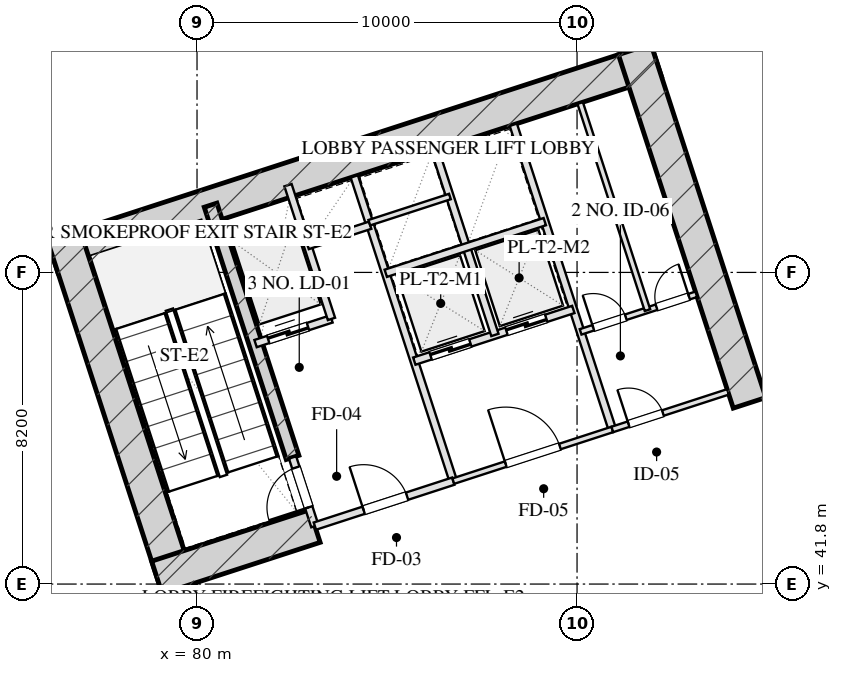
"""IFC4 building model, lengths in metres.
Left out: names, types, materials, properties, quantities, classifications, styles, units other than length and angle.
Written with IfcOpenShell. Run it as: python <this file> out.ifc"""

import sys

from ifc_helpers import new_model, si_unit, direction, frame, frame_2d, origin, place, context, subcontext, project, spatial, rectangle, extrude, element, fill, save


model = new_model("IFC4")
c1 = context("Model", 3, precision=1e-05, world=origin(), true_north=direction((0.0, 1.0)))
c2 = subcontext(c1, "Body", "Model", "MODEL_VIEW")
j1 = project(units=[si_unit("LENGTHUNIT", "METRE"), si_unit("PLANEANGLEUNIT", "RADIAN")], contexts=[c1])
p1 = place(None, origin())
s1 = spatial("IfcSite", under=j1, at=p1, CompositionType="ELEMENT")
p2 = place(p1, origin())
s2 = spatial("IfcBuilding", under=s1, at=p2, CompositionType="ELEMENT")
p3 = place(p2, frame((0.0, 0.0, 6.0)))
s3 = spatial("IfcBuildingStorey", under=s2, at=p3, CompositionType="ELEMENT", Elevation=6.0)
p4 = place(p3, frame((76.201, 50.419, 0.0), z_axis=(0.0, 0.0, 1.0), x_axis=(0.951056412142, 0.309017314926, 0.0)))
e1 = element("IfcWall", 1, at=p4, inside=s3, PredefinedType="SHEAR", context=c2, shape_type="SweptSolid", body=[
    extrude(rectangle(XDim=16.7, YDim=0.9, at=frame_2d((8.35, 0.0))), origin(), (0.0, 0.0, 1.0), 5.5),
])
for number, where, z_axis, x_axis in (
    (2, (79.512, 41.685, 0.0), (0.0, 0.0, 1.0), (-0.309, 0.951, 0.0)),
    (3, (94.539, 46.568, 0.0), (0.0, 0.0, 1.0), (-0.309, 0.951, 0.0)),
):
    element("IfcWall", number, at=place(p3, frame(where, z_axis=z_axis, x_axis=x_axis)), inside=s3, PredefinedType="SHEAR", context=c2, shape_type="SweptSolid", body=[
        extrude(rectangle(XDim=9.78, YDim=0.9, at=frame_2d((4.89, 0.0))), origin(), (0.0, 0.0, 1.0), 5.5),
    ])
p5 = place(p3, frame((82.514, 45.131, 0.0), z_axis=(0.0, 0.0, 1.0), x_axis=(-0.308988790936, 0.951065679686, 0.0)))
e4 = element("IfcWall", 4, at=p5, inside=s3, PredefinedType="SHEAR", context=c2, shape_type="SweptSolid", body=[
    extrude(rectangle(XDim=6.98, YDim=0.35, at=frame_2d((3.49, 0.0))), origin(), (0.0, 0.0, 1.0), 5.5),
])
p6 = place(p3, frame((78.945, 41.974, 0.0), z_axis=(0.0, 0.0, 1.0), x_axis=(0.951058289404, 0.309011537255, 0.0)))
e5 = element("IfcWall", 5, at=p6, inside=s3, PredefinedType="SHEAR", context=c2, shape_type="SweptSolid", body=[
    extrude(rectangle(XDim=4.37, YDim=0.9, at=frame_2d((2.185, 0.0))), origin(), (0.0, 0.0, 1.0), 5.5),
])
p7 = place(p3, frame((83.101, 43.324, 0.0), z_axis=(0.0, 0.0, 1.0), x_axis=(-0.309048298632, 0.951046344356, 0.0)))
e6 = element("IfcWall", 6, at=p7, inside=s3, PredefinedType="PARTITIONING", context=c2, shape_type="SweptSolid", body=[
    extrude(rectangle(XDim=1.9, YDim=0.2, at=frame_2d((0.95, 0.0))), origin(), (0.0, 0.0, 1.0), 5.185),
])
p8 = place(p7, frame((0.52, 0.0, 0.0)))
e7 = element("IfcOpeningElement", 7, at=p8, cuts=e6, PredefinedType="OPENING", context=c2, shape_type="SweptSolid", body=[
    extrude(rectangle(XDim=1.1, YDim=2.05, at=frame_2d((0.55, 1.025))), frame((0.0, 0.11, 0.0), z_axis=(0.0, -1.0, 0.0), x_axis=(1.0, 0.0, 0.0)), (0.0, 0.0, 1.0), 0.22),
])
p9 = place(p3, frame((86.743, 44.508, 0.0), z_axis=(0.0, 0.0, 1.0), x_axis=(-0.309016001439, 0.951056838919, 0.0)))
e8 = element("IfcWall", 8, at=p9, inside=s3, PredefinedType="PARTITIONING", context=c2, shape_type="SweptSolid", body=[
    extrude(rectangle(XDim=8.43, YDim=0.2, at=frame_2d((4.215, 0.0))), origin(), (0.0, 0.0, 1.0), 5.185),
])
p10 = place(p3, frame((83.101, 43.324, 0.0), z_axis=(0.0, 0.0, 1.0), x_axis=(0.951052804469, 0.309028417967, 0.0)))
e9 = element("IfcWall", 9, at=p10, inside=s3, PredefinedType="PARTITIONING", context=c2, shape_type="SweptSolid", body=[
    extrude(rectangle(XDim=3.83, YDim=0.2, at=frame_2d((1.915, 0.0))), origin(), (0.0, 0.0, 1.0), 5.185),
])
p11 = place(p10, frame((1.35, 0.0, 0.0)))
e10 = element("IfcOpeningElement", 10, at=p11, cuts=e9, PredefinedType="OPENING", context=c2, shape_type="SweptSolid", body=[
    extrude(rectangle(XDim=1.2, YDim=2.05, at=frame_2d((0.6, 1.025))), frame((0.0, 0.11, 0.0), z_axis=(0.0, -1.0, 0.0), x_axis=(1.0, 0.0, 0.0)), (0.0, 0.0, 1.0), 0.22),
])
p12 = place(p3, frame((81.54, 48.127, 0.0), z_axis=(0.0, 0.0, 1.0), x_axis=(0.951062257173, 0.308999325213, 0.0)))
e11 = element("IfcWall", 11, at=p12, inside=s3, PredefinedType="PARTITIONING", context=c2, shape_type="SweptSolid", body=[
    extrude(rectangle(XDim=2.1, YDim=0.2, at=frame_2d((1.05, 0.0))), origin(), (0.0, 0.0, 1.0), 5.185),
])
p13 = place(p12, frame((0.35, 0.0, 0.0)))
e12 = element("IfcOpeningElement", 12, at=p13, cuts=e11, PredefinedType="OPENING", context=c2, shape_type="SweptSolid", body=[
    extrude(rectangle(XDim=1.1, YDim=2.05, at=frame_2d((0.55, 1.025))), frame((0.0, 0.11, 0.0), z_axis=(0.0, -1.0, 0.0), x_axis=(1.0, 0.0, 0.0)), (0.0, 0.0, 1.0), 0.22),
])
p14 = place(p3, frame((83.538, 48.776, 0.0), z_axis=(0.0, 0.0, 1.0), x_axis=(-0.3089935693, 0.951064127245, 0.0)))
e13 = element("IfcWall", 13, at=p14, inside=s3, PredefinedType="PARTITIONING", context=c2, shape_type="SweptSolid", body=[
    extrude(rectangle(XDim=3.7, YDim=0.2, at=frame_2d((1.85, 0.0))), origin(), (0.0, 0.0, 1.0), 5.185),
])
p15 = place(p3, frame((82.91, 50.707, 0.0), z_axis=(0.0, 0.0, 1.0), x_axis=(0.951041328149, 0.309063734775, 0.0)))
e14 = element("IfcWall", 14, at=p15, inside=s3, PredefinedType="PARTITIONING", context=c2, shape_type="SweptSolid", body=[
    extrude(rectangle(XDim=1.73, YDim=0.2, at=frame_2d((0.865, 0.0))), origin(), (0.0, 0.0, 1.0), 5.185),
])
p16 = place(p3, frame((90.928, 45.868, 0.0), z_axis=(0.0, 0.0, 1.0), x_axis=(-0.309042196757, 0.951048327176, 0.0)))
e15 = element("IfcWall", 15, at=p16, inside=s3, PredefinedType="PARTITIONING", context=c2, shape_type="SweptSolid", body=[
    extrude(rectangle(XDim=8.43, YDim=0.2, at=frame_2d((4.215, 0.0))), origin(), (0.0, 0.0, 1.0), 5.185),
])
p17 = place(p3, frame((86.743, 44.508, 0.0), z_axis=(0.0, 0.0, 1.0), x_axis=(0.951063829732, 0.308994485023, 0.0)))
e16 = element("IfcWall", 16, at=p17, inside=s3, PredefinedType="PARTITIONING", context=c2, shape_type="SweptSolid", body=[
    extrude(rectangle(XDim=4.4, YDim=0.15, at=frame_2d((2.2, 0.0))), origin(), (0.0, 0.0, 1.0), 5.185),
])
p18 = place(p17, frame((1.45, 0.0, 0.0)))
e17 = element("IfcOpeningElement", 17, at=p18, cuts=e16, PredefinedType="OPENING", context=c2, shape_type="SweptSolid", body=[
    extrude(rectangle(XDim=1.5, YDim=2.05, at=frame_2d((0.75, 1.025))), frame((0.0, 0.085, 0.0), z_axis=(0.0, -1.0, 0.0), x_axis=(1.0, 0.0, 0.0)), (0.0, 0.0, 1.0), 0.17),
])
p19 = place(p3, frame((85.718, 47.666, 0.0), z_axis=(0.0, 0.0, 1.0), x_axis=(0.951058531764, 0.30901079133, 0.0)))
e18 = element("IfcWall", 18, at=p19, inside=s3, PredefinedType="PARTITIONING", context=c2, shape_type="SweptSolid", body=[
    extrude(rectangle(XDim=4.4, YDim=0.2, at=frame_2d((2.2, 0.0))), origin(), (0.0, 0.0, 1.0), 5.185),
])
p20 = place(p19, frame((0.45, 0.0, 0.0)))
e19 = element("IfcOpeningElement", 19, at=p20, cuts=e18, PredefinedType="OPENING", context=c2, shape_type="SweptSolid", body=[
    extrude(rectangle(XDim=1.1, YDim=2.05, at=frame_2d((0.55, 1.025))), frame((0.0, 0.11, 0.0), z_axis=(0.0, -1.0, 0.0), x_axis=(1.0, 0.0, 0.0)), (0.0, 0.0, 1.0), 0.22),
])
p21 = place(p19, frame((2.55, 0.0, 0.0)))
e20 = element("IfcOpeningElement", 20, at=p21, cuts=e18, PredefinedType="OPENING", context=c2, shape_type="SweptSolid", body=[
    extrude(rectangle(XDim=1.1, YDim=2.05, at=frame_2d((0.55, 1.025))), frame((0.0, 0.11, 0.0), z_axis=(0.0, -1.0, 0.0), x_axis=(1.0, 0.0, 0.0)), (0.0, 0.0, 1.0), 0.22),
])
p22 = place(p3, frame((87.838, 48.354, 0.0), z_axis=(0.0, 0.0, 1.0), x_axis=(-0.3090093719, 0.951058992953, 0.0)))
e21 = element("IfcWall", 21, at=p22, inside=s3, PredefinedType="PARTITIONING", context=c2, shape_type="SweptSolid", body=[
    extrude(rectangle(XDim=5.11, YDim=0.2, at=frame_2d((2.555, 0.0))), origin(), (0.0, 0.0, 1.0), 5.185),
])
p23 = place(p3, frame((84.967, 49.977, 0.0), z_axis=(0.0, 0.0, 1.0), x_axis=(0.951063829732, 0.308994485023, 0.0)))
e22 = element("IfcWall", 22, at=p23, inside=s3, PredefinedType="PARTITIONING", context=c2, shape_type="SweptSolid", body=[
    extrude(rectangle(XDim=4.4, YDim=0.2, at=frame_2d((2.2, 0.0))), origin(), (0.0, 0.0, 1.0), 5.185),
])
p24 = place(p3, frame((84.534, 51.308, 0.0), z_axis=(0.0, 0.0, 1.0), x_axis=(0.951075093106, 0.308959814982, 0.0)))
e23 = element("IfcWall", 23, at=p24, inside=s3, PredefinedType="PARTITIONING", context=c2, shape_type="SweptSolid", body=[
    extrude(rectangle(XDim=2.23, YDim=0.15, at=frame_2d((1.115, 0.0))), origin(), (0.0, 0.0, 1.0), 5.185),
])
p25 = place(p3, frame((90.928, 45.868, 0.0), z_axis=(0.0, 0.0, 1.0), x_axis=(0.951059297078, 0.309008435874, 0.0)))
e24 = element("IfcWall", 24, at=p25, inside=s3, PredefinedType="PARTITIONING", context=c2, shape_type="SweptSolid", body=[
    extrude(rectangle(XDim=3.2, YDim=0.15, at=frame_2d((1.6, 0.0))), origin(), (0.0, 0.0, 1.0), 5.185),
])
p26 = place(p25, frame((0.45, 0.0, 0.0)))
e25 = element("IfcOpeningElement", 25, at=p26, cuts=e24, PredefinedType="OPENING", context=c2, shape_type="SweptSolid", body=[
    extrude(rectangle(XDim=0.95, YDim=2.05, at=frame_2d((0.475, 1.025))), frame((0.0, 0.085, 0.0), z_axis=(0.0, -1.0, 0.0), x_axis=(1.0, 0.0, 0.0)), (0.0, 0.0, 1.0), 0.17),
])
p27 = place(p3, frame((90.094, 48.436, 0.0), z_axis=(0.0, 0.0, 1.0), x_axis=(0.951066581729, 0.308986014439, 0.0)))
e26 = element("IfcWall", 26, at=p27, inside=s3, PredefinedType="PARTITIONING", context=c2, shape_type="SweptSolid", body=[
    extrude(rectangle(XDim=3.2, YDim=0.15, at=frame_2d((1.6, 0.0))), origin(), (0.0, 0.0, 1.0), 5.185),
])
p28 = place(p27, frame((0.35, 0.0, 0.0)))
e27 = element("IfcOpeningElement", 27, at=p28, cuts=e26, PredefinedType="OPENING", context=c2, shape_type="SweptSolid", body=[
    extrude(rectangle(XDim=0.9, YDim=2.05, at=frame_2d((0.45, 1.025))), frame((0.0, 0.085, 0.0), z_axis=(0.0, -1.0, 0.0), x_axis=(1.0, 0.0, 0.0)), (0.0, 0.0, 1.0), 0.17),
])
p29 = place(p27, frame((2.1, 0.0, 0.0)))
e28 = element("IfcOpeningElement", 28, at=p29, cuts=e26, PredefinedType="OPENING", context=c2, shape_type="SweptSolid", body=[
    extrude(rectangle(XDim=0.9, YDim=2.05, at=frame_2d((0.45, 1.025))), frame((0.0, 0.085, 0.0), z_axis=(0.0, -1.0, 0.0), x_axis=(1.0, 0.0, 0.0)), (0.0, 0.0, 1.0), 0.17),
])
p30 = place(p3, frame((91.853, 49.007, 0.0), z_axis=(0.0, 0.0, 1.0), x_axis=(-0.309022487551, 0.951054731437, 0.0)))
e29 = element("IfcWall", 29, at=p30, inside=s3, PredefinedType="PARTITIONING", context=c2, shape_type="SweptSolid", body=[
    extrude(rectangle(XDim=5.73, YDim=0.15, at=frame_2d((2.865, 0.0))), origin(), (0.0, 0.0, 1.0), 5.185),
])
p31 = place(p8, origin())
e30 = element("IfcDoor", 30, at=p31, inside=s3, OperationType="SINGLE_SWING_LEFT", PredefinedType="DOOR", context=c2, shape_type="SweptSolid", body=[
    extrude(rectangle(XDim=1.1, YDim=2.05, at=frame_2d((0.55, 1.025))), frame((0.0, 0.025, 0.0), z_axis=(0.0, -1.0, 0.0), x_axis=(1.0, 0.0, 0.0)), (0.0, 0.0, 1.0), 0.05),
])
fill(e7, e30)
p32 = place(p11, origin())
e31 = element("IfcDoor", 31, at=p32, inside=s3, OperationType="SINGLE_SWING_LEFT", PredefinedType="DOOR", context=c2, shape_type="SweptSolid", body=[
    extrude(rectangle(XDim=1.2, YDim=2.05, at=frame_2d((0.6, 1.025))), frame((0.0, 0.025, 0.0), z_axis=(0.0, -1.0, 0.0), x_axis=(1.0, 0.0, 0.0)), (0.0, 0.0, 1.0), 0.05),
])
fill(e10, e31)
p33 = place(p13, origin())
e32 = element("IfcDoor", 32, at=p33, inside=s3, OperationType="DOUBLE_DOOR_SLIDING", PredefinedType="DOOR", context=c2, shape_type="SweptSolid", body=[
    extrude(rectangle(XDim=1.1, YDim=2.05, at=frame_2d((0.55, 1.025))), frame((0.0, 0.025, 0.0), z_axis=(0.0, -1.0, 0.0), x_axis=(1.0, 0.0, 0.0)), (0.0, 0.0, 1.0), 0.05),
])
fill(e12, e32)
p34 = place(p18, origin())
e33 = element("IfcDoor", 33, at=p34, inside=s3, OperationType="SINGLE_SWING_LEFT", PredefinedType="DOOR", context=c2, shape_type="SweptSolid", body=[
    extrude(rectangle(XDim=1.5, YDim=2.05, at=frame_2d((0.75, 1.025))), frame((0.0, 0.025, 0.0), z_axis=(0.0, -1.0, 0.0), x_axis=(1.0, 0.0, 0.0)), (0.0, 0.0, 1.0), 0.05),
])
fill(e17, e33)
p35 = place(p20, origin())
e34 = element("IfcDoor", 34, at=p35, inside=s3, OperationType="DOUBLE_DOOR_SLIDING", PredefinedType="DOOR", context=c2, shape_type="SweptSolid", body=[
    extrude(rectangle(XDim=1.1, YDim=2.05, at=frame_2d((0.55, 1.025))), frame((0.0, 0.025, 0.0), z_axis=(0.0, -1.0, 0.0), x_axis=(1.0, 0.0, 0.0)), (0.0, 0.0, 1.0), 0.05),
])
fill(e19, e34)
p36 = place(p21, origin())
e35 = element("IfcDoor", 35, at=p36, inside=s3, OperationType="DOUBLE_DOOR_SLIDING", PredefinedType="DOOR", context=c2, shape_type="SweptSolid", body=[
    extrude(rectangle(XDim=1.1, YDim=2.05, at=frame_2d((0.55, 1.025))), frame((0.0, 0.025, 0.0), z_axis=(0.0, -1.0, 0.0), x_axis=(1.0, 0.0, 0.0)), (0.0, 0.0, 1.0), 0.05),
])
fill(e20, e35)
p37 = place(p26, origin())
e36 = element("IfcDoor", 36, at=p37, inside=s3, OperationType="SINGLE_SWING_LEFT", PredefinedType="DOOR", context=c2, shape_type="SweptSolid", body=[
    extrude(rectangle(XDim=0.95, YDim=2.05, at=frame_2d((0.475, 1.025))), frame((0.0, 0.025, 0.0), z_axis=(0.0, -1.0, 0.0), x_axis=(1.0, 0.0, 0.0)), (0.0, 0.0, 1.0), 0.05),
])
fill(e25, e36)
p38 = place(p28, origin())
e37 = element("IfcDoor", 37, at=p38, inside=s3, OperationType="SINGLE_SWING_LEFT", PredefinedType="DOOR", context=c2, shape_type="SweptSolid", body=[
    extrude(rectangle(XDim=0.9, YDim=2.05, at=frame_2d((0.45, 1.025))), frame((0.0, 0.025, 0.0), z_axis=(0.0, -1.0, 0.0), x_axis=(1.0, 0.0, 0.0)), (0.0, 0.0, 1.0), 0.05),
])
fill(e27, e37)
p39 = place(p29, origin())
e38 = element("IfcDoor", 38, at=p39, inside=s3, OperationType="SINGLE_SWING_RIGHT", PredefinedType="DOOR", context=c2, shape_type="SweptSolid", body=[
    extrude(rectangle(XDim=0.9, YDim=2.05, at=frame_2d((0.45, 1.025))), frame((0.0, 0.025, 0.0), z_axis=(0.0, -1.0, 0.0), x_axis=(1.0, 0.0, 0.0)), (0.0, 0.0, 1.0), 0.05),
])
fill(e28, e38)
save(model, sys.argv[1])
